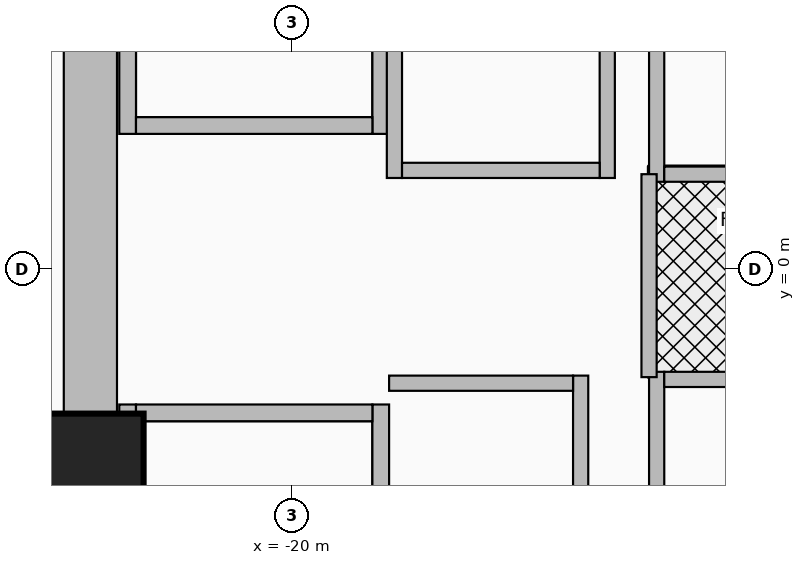
"""IFC4 building model, lengths in metres.
Left out: names, types, materials, properties, quantities, classifications, styles, units other than length and angle.
Written with IfcOpenShell. Run it as: python <this file> out.ifc"""

import sys

from ifc_helpers import new_model, si_unit, direction, frame, frame_2d, origin, origin_2d, place, context, subcontext, project, spatial, rectangle, extrude, source, transform, mapped, element, fill, save


model = new_model("IFC4")
c1 = context("Model", 3, precision=1e-05, world=origin(), true_north=direction((0.0, 1.0)))
c2 = subcontext(c1, "Body", "Model", "MODEL_VIEW")
j1 = project(units=[si_unit("LENGTHUNIT", "METRE"), si_unit("PLANEANGLEUNIT", "RADIAN")], contexts=[c1])
p1 = place(None, origin())
s1 = spatial("IfcSite", under=j1, at=p1, CompositionType="ELEMENT")
p2 = place(p1, origin())
s2 = spatial("IfcBuilding", under=s1, at=p2, CompositionType="ELEMENT")
p3 = place(p2, frame((0.0, 0.0, 10.4)))
s3 = spatial("IfcBuildingStorey", under=s2, at=p3, CompositionType="ELEMENT", Elevation=10.4)
for number, where, z_axis, x_axis in (
    (1, (-22.16, 1.78, 0.0), (0.0, 0.0, 1.0), (0.0, 1.0, 0.0)),
    (2, (-18.83, 1.78, 0.0), (0.0, 0.0, 1.0), (0.0, 1.0, 0.0)),
):
    element("IfcWall", number, at=place(p3, frame(where, z_axis=z_axis, x_axis=x_axis)), inside=s3, PredefinedType="SHEAR", context=c2, shape_type="SweptSolid", body=[
        extrude(rectangle(XDim=8.67, YDim=0.22, at=frame_2d((4.335, 0.0))), origin(), (0.0, 0.0, 1.0), 4.92),
    ])
p4 = place(p3, frame((-22.05, 1.89, 0.0), z_axis=(0.0, 0.0, 1.0), x_axis=(1.0, 0.0, 0.0)))
e3 = element("IfcWall", 3, at=p4, inside=s3, PredefinedType="SHEAR", context=c2, shape_type="SweptSolid", body=[
    extrude(rectangle(XDim=3.11, YDim=0.22, at=frame_2d((1.555, 0.0))), origin(), (0.0, 0.0, 1.0), 4.92),
])
p5 = place(p4, frame((1.0, 0.0, 0.0)))
e4 = element("IfcOpeningElement", 4, at=p5, cuts=e3, PredefinedType="OPENING", context=c2, shape_type="SweptSolid", body=[
    extrude(rectangle(XDim=1.1, YDim=2.15, at=frame_2d((0.55, 1.075))), frame((0.0, 0.125, 0.0), z_axis=(0.0, -1.0, 0.0), x_axis=(1.0, 0.0, 0.0)), (0.0, 0.0, 1.0), 0.25),
])
for number, where, z_axis, x_axis in (
    (5, (-22.16, -10.45, 0.0), (0.0, 0.0, 1.0), (0.0, 1.0, 0.0)),
    (6, (-18.83, -10.45, 0.0), (0.0, 0.0, 1.0), (0.0, 1.0, 0.0)),
):
    element("IfcWall", number, at=place(p3, frame(where, z_axis=z_axis, x_axis=x_axis)), inside=s3, PredefinedType="SHEAR", context=c2, shape_type="SweptSolid", body=[
        extrude(rectangle(XDim=8.67, YDim=0.22, at=frame_2d((4.335, 0.0))), origin(), (0.0, 0.0, 1.0), 4.92),
    ])
p6 = place(p3, frame((-22.05, -1.89, 0.0), z_axis=(0.0, 0.0, 1.0), x_axis=(1.0, 0.0, 0.0)))
e7 = element("IfcWall", 7, at=p6, inside=s3, PredefinedType="SHEAR", context=c2, shape_type="SweptSolid", body=[
    extrude(rectangle(XDim=3.11, YDim=0.22, at=frame_2d((1.555, 0.0))), origin(), (0.0, 0.0, 1.0), 4.92),
])
p7 = place(p6, frame((1.0, 0.0, 0.0)))
e8 = element("IfcOpeningElement", 8, at=p7, cuts=e7, PredefinedType="OPENING", context=c2, shape_type="SweptSolid", body=[
    extrude(rectangle(XDim=1.1, YDim=2.15, at=frame_2d((0.55, 1.075))), frame((0.0, 0.125, 0.0), z_axis=(0.0, -1.0, 0.0), x_axis=(1.0, 0.0, 0.0)), (0.0, 0.0, 1.0), 0.25),
])
p8 = place(p3, frame((-22.65, -11.15, 0.0), z_axis=(0.0, 0.0, 1.0), x_axis=(0.0, 1.0, 0.0)))
e9 = element("IfcWall", 9, at=p8, inside=s3, PredefinedType="SHEAR", context=c2, shape_type="SweptSolid", body=[
    extrude(rectangle(XDim=22.3, YDim=0.7, at=frame_2d((11.15, 0.0))), origin(), (0.0, 0.0, 1.0), 4.92),
])
m1 = source(origin(), c2, "Body", "SweptSolid", [
    extrude(rectangle(XDim=1.4, YDim=1.4, at=origin_2d()), origin(), (0.0, 0.0, 1.0), 5.2),
])
p9 = place(p3, frame((-22.65, -2.6, 0.0), z_axis=(0.0, 0.0, 1.0), x_axis=(1.0, 0.0, 0.0)))
e10 = element("IfcColumn", 10, at=p9, inside=s3, PredefinedType="COLUMN", context=c2, shape_type="MappedRepresentation", body=[
    mapped(m1, transform((0.0, 0.0, 0.0), x_axis=(1.0, 0.0, 0.0), y_axis=(0.0, 1.0, 0.0), z_axis=(0.0, 0.0, 1.0), scale=1.0)),
])
for number, where, z_axis, x_axis in (
    (11, (-18.65, 1.2, 0.0), (0.0, 0.0, 1.0), (0.0, 1.0, 0.0)),
    (12, (-15.85, 1.2, 0.0), (0.0, 0.0, 1.0), (0.0, 1.0, 0.0)),
):
    element("IfcWall", number, at=place(p3, frame(where, z_axis=z_axis, x_axis=x_axis)), inside=s3, PredefinedType="MOVABLE", context=c2, shape_type="SweptSolid", body=[
        extrude(rectangle(XDim=3.225, YDim=0.2, at=frame_2d((1.613, 0.0))), origin(), (0.0, 0.0, 1.0), 4.92),
    ])
p10 = place(p3, frame((-18.55, 1.3, 0.0), z_axis=(0.0, 0.0, 1.0), x_axis=(1.0, 0.0, 0.0)))
e13 = element("IfcWall", 13, at=p10, inside=s3, PredefinedType="MOVABLE", context=c2, shape_type="SweptSolid", body=[
    extrude(rectangle(XDim=2.6, YDim=0.2, at=frame_2d((1.3, 0.0))), origin(), (0.0, 0.0, 1.0), 4.92),
])
p11 = place(p10, frame((0.7, 0.0, 0.0)))
e14 = element("IfcOpeningElement", 14, at=p11, cuts=e13, PredefinedType="OPENING", context=c2, shape_type="SweptSolid", body=[
    extrude(rectangle(XDim=1.2, YDim=2.1, at=frame_2d((0.6, 1.05))), frame((0.0, 0.115, 0.0), z_axis=(0.0, -1.0, 0.0), x_axis=(1.0, 0.0, 0.0)), (0.0, 0.0, 1.0), 0.23),
])
p12 = place(p3, frame((-16.2, -4.6, 0.0), z_axis=(0.0, 0.0, 1.0), x_axis=(0.0, 1.0, 0.0)))
e15 = element("IfcWall", 15, at=p12, inside=s3, PredefinedType="MOVABLE", context=c2, shape_type="SweptSolid", body=[
    extrude(rectangle(XDim=3.2, YDim=0.2, at=frame_2d((1.6, 0.0))), origin(), (0.0, 0.0, 1.0), 4.92),
])
p13 = place(p3, frame((-18.72, -1.5, 0.0), z_axis=(0.0, 0.0, 1.0), x_axis=(1.0, 0.0, 0.0)))
e16 = element("IfcWall", 16, at=p13, inside=s3, PredefinedType="MOVABLE", context=c2, shape_type="SweptSolid", body=[
    extrude(rectangle(XDim=2.42, YDim=0.2, at=frame_2d((1.21, 0.0))), origin(), (0.0, 0.0, 1.0), 4.92),
])
p14 = place(p13, frame((0.61, 0.0, 0.0)))
e17 = element("IfcOpeningElement", 17, at=p14, cuts=e16, PredefinedType="OPENING", context=c2, shape_type="SweptSolid", body=[
    extrude(rectangle(XDim=1.2, YDim=2.1, at=frame_2d((0.6, 1.05))), frame((0.0, 0.115, 0.0), z_axis=(0.0, -1.0, 0.0), x_axis=(1.0, 0.0, 0.0)), (0.0, 0.0, 1.0), 0.23),
])
p15 = place(p3, frame((-15.2, 1.15, 0.0), z_axis=(0.0, 0.0, 1.0), x_axis=(0.0, 1.0, 0.0)))
e18 = element("IfcWall", 18, at=p15, inside=s3, PredefinedType="MOVABLE", context=c2, shape_type="SweptSolid", body=[
    extrude(rectangle(XDim=2.25, YDim=0.2, at=frame_2d((1.125, 0.0))), origin(), (0.0, 0.0, 1.0), 4.92),
])
p16 = place(p3, frame((-15.1, 1.25, 0.0), z_axis=(0.0, 0.0, 1.0), x_axis=(1.0, 0.0, 0.0)))
e19 = element("IfcWall", 19, at=p16, inside=s3, PredefinedType="MOVABLE", context=c2, shape_type="SweptSolid", body=[
    extrude(rectangle(XDim=1.92, YDim=0.2, at=frame_2d((0.96, 0.0))), origin(), (0.0, 0.0, 1.0), 4.92),
])
p17 = place(p3, frame((-15.2, -3.7, 0.0), z_axis=(0.0, 0.0, 1.0), x_axis=(0.0, 1.0, 0.0)))
e20 = element("IfcWall", 20, at=p17, inside=s3, PredefinedType="MOVABLE", context=c2, shape_type="SweptSolid", body=[
    extrude(rectangle(XDim=2.35, YDim=0.2, at=frame_2d((1.175, 0.0))), origin(), (0.0, 0.0, 1.0), 4.92),
])
p18 = place(p3, frame((-15.1, -1.45, 0.0), z_axis=(0.0, 0.0, 1.0), x_axis=(1.0, 0.0, 0.0)))
e21 = element("IfcWall", 21, at=p18, inside=s3, PredefinedType="MOVABLE", context=c2, shape_type="SweptSolid", body=[
    extrude(rectangle(XDim=1.92, YDim=0.2, at=frame_2d((0.96, 0.0))), origin(), (0.0, 0.0, 1.0), 4.92),
])
p19 = place(p3, frame((-15.3, -1.42, 0.0), z_axis=(0.0, 0.0, 1.0), x_axis=(0.0, 1.0, 0.0)))
e22 = element("IfcWall", 22, at=p19, inside=s3, PredefinedType="PARTITIONING", context=c2, shape_type="SweptSolid", body=[
    extrude(rectangle(XDim=2.67, YDim=0.2, at=frame_2d((1.335, 0.0))), origin(), (0.0, 0.0, 1.0), 4.92),
])
p20 = place(p19, frame((0.78, 0.0, 0.0)))
e23 = element("IfcOpeningElement", 23, at=p20, cuts=e22, PredefinedType="OPENING", context=c2, shape_type="SweptSolid", body=[
    extrude(rectangle(XDim=1.05, YDim=2.15, at=frame_2d((0.525, 1.075))), frame((0.0, 0.115, 0.0), z_axis=(0.0, -1.0, 0.0), x_axis=(1.0, 0.0, 0.0)), (0.0, 0.0, 1.0), 0.23),
])
p21 = place(p11, origin())
e24 = element("IfcDoor", 24, at=p21, inside=s3, OperationType="DOUBLE_DOOR_SLIDING", PredefinedType="DOOR", context=c2, shape_type="SweptSolid", body=[
    extrude(rectangle(XDim=1.2, YDim=2.1, at=frame_2d((0.6, 1.05))), frame((0.0, 0.025, 0.0), z_axis=(0.0, -1.0, 0.0), x_axis=(1.0, 0.0, 0.0)), (0.0, 0.0, 1.0), 0.05),
])
fill(e14, e24)
p22 = place(p14, origin())
e25 = element("IfcDoor", 25, at=p22, inside=s3, OperationType="DOUBLE_DOOR_SLIDING", PredefinedType="DOOR", context=c2, shape_type="SweptSolid", body=[
    extrude(rectangle(XDim=1.2, YDim=2.1, at=frame_2d((0.6, 1.05))), frame((0.0, 0.025, 0.0), z_axis=(0.0, -1.0, 0.0), x_axis=(1.0, 0.0, 0.0)), (0.0, 0.0, 1.0), 0.05),
])
fill(e17, e25)
p23 = place(p20, origin())
e26 = element("IfcDoor", 26, at=p23, inside=s3, OperationType="SINGLE_SWING_RIGHT", PredefinedType="DOOR", context=c2, shape_type="SweptSolid", body=[
    extrude(rectangle(XDim=1.05, YDim=2.15, at=frame_2d((0.525, 1.075))), frame((0.0, 0.025, 0.0), z_axis=(0.0, -1.0, 0.0), x_axis=(1.0, 0.0, 0.0)), (0.0, 0.0, 1.0), 0.05),
])
fill(e23, e26)
p24 = place(p5, frame((1.1, 0.0, 0.0), z_axis=(0.0, 0.0, 1.0), x_axis=(-1.0, 0.0, 0.0)))
e27 = element("IfcDoor", 27, at=p24, inside=s3, OperationType="SINGLE_SWING_LEFT", PredefinedType="DOOR", context=c2, shape_type="SweptSolid", body=[
    extrude(rectangle(XDim=1.1, YDim=2.15, at=frame_2d((0.55, 1.075))), frame((0.0, 0.025, 0.0), z_axis=(0.0, -1.0, 0.0), x_axis=(1.0, 0.0, 0.0)), (0.0, 0.0, 1.0), 0.05),
])
fill(e4, e27)
p25 = place(p7, origin())
e28 = element("IfcDoor", 28, at=p25, inside=s3, OperationType="SINGLE_SWING_RIGHT", PredefinedType="DOOR", context=c2, shape_type="SweptSolid", body=[
    extrude(rectangle(XDim=1.1, YDim=2.15, at=frame_2d((0.55, 1.075))), frame((0.0, 0.025, 0.0), z_axis=(0.0, -1.0, 0.0), x_axis=(1.0, 0.0, 0.0)), (0.0, 0.0, 1.0), 0.05),
])
fill(e8, e28)
save(model, sys.argv[1])
